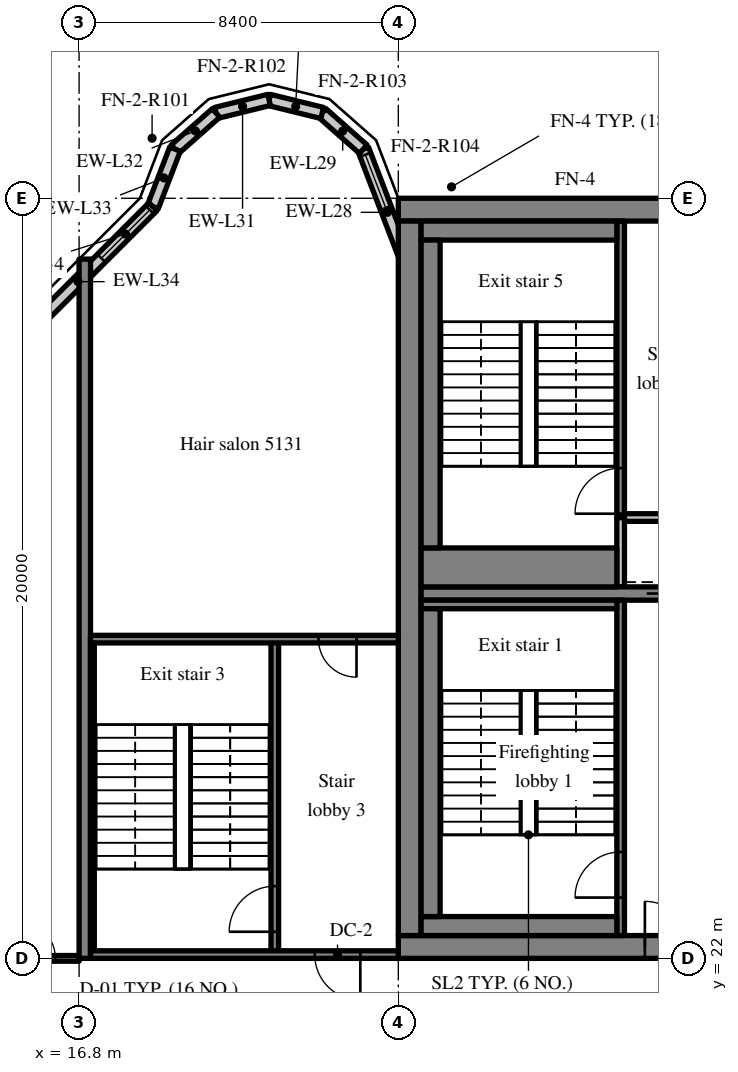
"""IFC4 building model, lengths in metres.
Left out: names, types, materials, properties, quantities, classifications, styles, units other than length and angle.
Written with IfcOpenShell. Run it as: python <this file> out.ifc"""

import sys

from ifc_helpers import new_model, si_unit, direction, frame, frame_2d, origin, place, context, subcontext, project, spatial, rectangle, extrude, source, transform, mapped, element, fill, save


model = new_model("IFC4")
c1 = context("Model", 3, precision=1e-05, world=origin(), true_north=direction((0.0, 1.0)))
c2 = subcontext(c1, "Body", "Model", "MODEL_VIEW")
j1 = project(units=[si_unit("LENGTHUNIT", "METRE"), si_unit("PLANEANGLEUNIT", "RADIAN")], contexts=[c1])
p1 = place(None, origin())
s1 = spatial("IfcSite", under=j1, at=p1, CompositionType="ELEMENT")
p2 = place(p1, origin())
s2 = spatial("IfcBuilding", under=s1, at=p2, CompositionType="ELEMENT")
p3 = place(p2, frame((0.0, 0.0, 214.0)))
s3 = spatial("IfcBuildingStorey", under=s2, at=p3, CompositionType="ELEMENT", Elevation=214.0)
m1 = source(origin(), c2, "Body", "SweptSolid", [
    extrude(rectangle(XDim=50.4, YDim=0.6, at=frame_2d((25.2, 0.0))), origin(), (0.0, 0.0, 1.0), 3.62),
])
p4 = place(p3, frame((25.2, 22.3, 0.0), z_axis=(0.0, 0.0, 1.0), x_axis=(1.0, 0.0, 0.0)))
e1 = element("IfcWall", 1, at=p4, inside=s3, PredefinedType="SHEAR", context=c2, shape_type="MappedRepresentation", body=[
    mapped(m1, transform((0.0, 0.0, 0.0), scale=1.0)),
])
m2 = source(origin(), c2, "Body", "SweptSolid", [
    extrude(rectangle(XDim=1.8, YDim=2.1, at=frame_2d((0.9, 1.05))), frame((0.0, 0.31, 0.0), z_axis=(0.0, -1.0, 0.0), x_axis=(1.0, 0.0, 0.0)), (0.0, 0.0, 1.0), 0.62),
])
p5 = place(p4, frame((15.9, 0.0, 0.0)))
e2 = element("IfcOpeningElement", 2, at=p5, cuts=e1, PredefinedType="OPENING", context=c2, shape_type="MappedRepresentation", body=[
    mapped(m2, transform((0.0, 0.0, 0.0), scale=1.0)),
])
m3 = source(origin(), c2, "Body", "SweptSolid", [
    extrude(rectangle(XDim=0.9, YDim=2.1, at=frame_2d((0.45, 1.05))), frame((0.0, 0.31, 0.0), z_axis=(0.0, -1.0, 0.0), x_axis=(1.0, 0.0, 0.0)), (0.0, 0.0, 1.0), 0.62),
])
p6 = place(p4, frame((9.687, 0.0, 0.0)))
e3 = element("IfcOpeningElement", 3, at=p6, cuts=e1, PredefinedType="OPENING", context=c2, shape_type="MappedRepresentation", body=[
    mapped(m3, transform((0.0, 0.0, 0.0), scale=1.0)),
])
p7 = place(p4, frame((21.513, 0.0, 0.0)))
e4 = element("IfcOpeningElement", 4, at=p7, cuts=e1, PredefinedType="OPENING", context=c2, shape_type="MappedRepresentation", body=[
    mapped(m3, transform((0.0, 0.0, 0.0), scale=1.0)),
])
p8 = place(p4, frame((32.7, 0.0, 0.0)))
e5 = element("IfcOpeningElement", 5, at=p8, cuts=e1, PredefinedType="OPENING", context=c2, shape_type="MappedRepresentation", body=[
    mapped(m2, transform((0.0, 0.0, 0.0), scale=1.0)),
])
m4 = source(origin(), c2, "Body", "SweptSolid", [
    extrude(rectangle(XDim=1.2, YDim=2.1, at=frame_2d((0.6, 1.05))), frame((0.0, 0.31, 0.0), z_axis=(0.0, -1.0, 0.0), x_axis=(1.0, 0.0, 0.0)), (0.0, 0.0, 1.0), 0.62),
])
p9 = place(p4, frame((6.488, 0.0, 0.0)))
e6 = element("IfcOpeningElement", 6, at=p9, cuts=e1, PredefinedType="OPENING", context=c2, shape_type="MappedRepresentation", body=[
    mapped(m4, transform((0.0, 0.0, 0.0), scale=1.0)),
])
p10 = place(p4, frame((47.925, 0.0, 0.0)))
e7 = element("IfcOpeningElement", 7, at=p10, cuts=e1, PredefinedType="OPENING", context=c2, shape_type="MappedRepresentation", body=[
    mapped(m4, transform((0.0, 0.0, 0.0), scale=1.0)),
])
p11 = place(p3, frame((25.2, 41.7, 0.0), z_axis=(0.0, 0.0, 1.0), x_axis=(1.0, 0.0, 0.0)))
e8 = element("IfcWall", 8, at=p11, inside=s3, PredefinedType="SHEAR", context=c2, shape_type="MappedRepresentation", body=[
    mapped(m1, transform((0.0, 0.0, 0.0), scale=1.0)),
])
m5 = source(origin(), c2, "Body", "SweptSolid", [
    extrude(rectangle(XDim=18.8, YDim=0.6, at=frame_2d((9.4, 0.0))), origin(), (0.0, 0.0, 1.0), 3.62),
])
p12 = place(p3, frame((25.5, 22.6, 0.0), z_axis=(0.0, 0.0, 1.0), x_axis=(0.0, 1.0, 0.0)))
e9 = element("IfcWall", 9, at=p12, inside=s3, PredefinedType="SHEAR", context=c2, shape_type="MappedRepresentation", body=[
    mapped(m5, transform((0.0, 0.0, 0.0), scale=1.0)),
])
m6 = source(origin(), c2, "Body", "SweptSolid", [
    extrude(rectangle(XDim=7.625, YDim=0.35, at=frame_2d((3.812, 0.0))), origin(), (0.0, 0.0, 1.0), 3.62),
])
p13 = place(p3, frame((25.8, 31.6, 0.0), z_axis=(0.0, 0.0, 1.0), x_axis=(1.0, 0.0, 0.0)))
e10 = element("IfcWall", 10, at=p13, inside=s3, PredefinedType="SHEAR", context=c2, shape_type="MappedRepresentation", body=[
    mapped(m6, transform((0.0, 0.0, 0.0), scale=1.0)),
])
m7 = source(origin(), c2, "Body", "SweptSolid", [
    extrude(rectangle(XDim=1.1, YDim=2.1, at=frame_2d((0.55, 1.05))), frame((0.0, 0.185, 0.0), z_axis=(0.0, -1.0, 0.0), x_axis=(1.0, 0.0, 0.0)), (0.0, 0.0, 1.0), 0.37),
])
p14 = place(p13, frame((5.938, 0.0, 0.0)))
e11 = element("IfcOpeningElement", 11, at=p14, cuts=e10, PredefinedType="OPENING", context=c2, shape_type="MappedRepresentation", body=[
    mapped(m7, transform((0.0, 0.0, 0.0), scale=1.0)),
])
m8 = source(origin(), c2, "Body", "SweptSolid", [
    extrude(rectangle(XDim=18.4, YDim=0.3, at=frame_2d((9.2, 0.0))), origin(), (0.0, 0.0, 1.0), 3.62),
])
p15 = place(p3, frame((16.95, 22.0, 0.0), z_axis=(0.0, 0.0, 1.0), x_axis=(0.0, 1.0, 0.0)))
e12 = element("IfcWall", 12, at=p15, inside=s3, PredefinedType="SHEAR", context=c2, shape_type="MappedRepresentation", body=[
    mapped(m8, transform((0.0, 0.0, 0.0), scale=1.0)),
])
m9 = source(origin(), c2, "Body", "SweptSolid", [
    extrude(rectangle(XDim=3.559, YDim=0.3, at=frame_2d((1.78, 0.0))), origin(), (0.0, 0.0, 1.0), 3.62),
])
p16 = place(p3, frame((25.55, 39.969, 0.0), z_axis=(0.0, 0.0, 1.0), x_axis=(-0.35779745313, 0.933799219604, 0.0)))
e13 = element("IfcWall", 13, at=p16, inside=s3, PredefinedType="SOLIDWALL", context=c2, shape_type="MappedRepresentation", body=[
    mapped(m9, transform((0.0, 0.0, 0.0), scale=1.0)),
])
m10 = source(origin(), c2, "Body", "SweptSolid", [
    extrude(rectangle(XDim=1.5, YDim=2.0, at=frame_2d((0.75, 1.0))), frame((0.0, 0.16, 0.0), z_axis=(0.0, -1.0, 0.0), x_axis=(1.0, 0.0, 0.0)), (0.0, 0.0, 1.0), 0.32),
])
p17 = place(p16, frame((1.903, 0.0, 0.9)))
e14 = element("IfcOpeningElement", 14, at=p17, cuts=e13, PredefinedType="OPENING", context=c2, shape_type="MappedRepresentation", body=[
    mapped(m10, transform((0.0, 0.0, 0.0), scale=1.0)),
])
m11 = source(origin(), c2, "Body", "SweptSolid", [
    extrude(rectangle(XDim=1.44, YDim=0.3, at=frame_2d((0.72, 0.0))), origin(), (0.0, 0.0, 1.0), 3.62),
])
p18 = place(p3, frame((24.277, 43.292, 0.0), z_axis=(0.0, 0.0, 1.0), x_axis=(-0.749649827867, 0.661834673902, 0.0)))
e15 = element("IfcWall", 15, at=p18, inside=s3, PredefinedType="SOLIDWALL", context=c2, shape_type="MappedRepresentation", body=[
    mapped(m11, transform((0.0, 0.0, 0.0), scale=1.0)),
])
m12 = source(origin(), c2, "Body", "SweptSolid", [
    extrude(rectangle(XDim=1.438, YDim=0.3, at=frame_2d((0.719, 0.0))), origin(), (0.0, 0.0, 1.0), 3.62),
])
p19 = place(p3, frame((23.197, 44.245, 0.0), z_axis=(0.0, 0.0, 1.0), x_axis=(-0.971152283879, 0.238460146601, 0.0)))
e16 = element("IfcWall", 16, at=p19, inside=s3, PredefinedType="SOLIDWALL", context=c2, shape_type="MappedRepresentation", body=[
    mapped(m12, transform((0.0, 0.0, 0.0), scale=1.0)),
])
m13 = source(origin(), c2, "Body", "SweptSolid", [
    extrude(rectangle(XDim=1.439, YDim=0.3, at=frame_2d((0.719, 0.0))), origin(), (0.0, 0.0, 1.0), 3.62),
])
p20 = place(p3, frame((21.8, 44.588, 0.0), z_axis=(0.0, 0.0, 1.0), x_axis=(-0.971161932466, -0.238420848351, 0.0)))
e17 = element("IfcWall", 17, at=p20, inside=s3, PredefinedType="SOLIDWALL", context=c2, shape_type="MappedRepresentation", body=[
    mapped(m13, transform((0.0, 0.0, 0.0), scale=1.0)),
])
m14 = source(origin(), c2, "Body", "SweptSolid", [
    extrude(rectangle(XDim=1.44, YDim=0.3, at=frame_2d((0.72, 0.0))), origin(), (0.0, 0.0, 1.0), 3.62),
])
p21 = place(p3, frame((20.403, 44.245, 0.0), z_axis=(0.0, 0.0, 1.0), x_axis=(-0.74957555648, -0.661918790432, 0.0)))
e18 = element("IfcWall", 18, at=p21, inside=s3, PredefinedType="SOLIDWALL", context=c2, shape_type="MappedRepresentation", body=[
    mapped(m14, transform((0.0, 0.0, 0.0), scale=1.0)),
])
m15 = source(origin(), c2, "Body", "SweptSolid", [
    extrude(rectangle(XDim=1.622, YDim=0.3, at=frame_2d((0.811, 0.0))), origin(), (0.0, 0.0, 1.0), 3.62),
])
p22 = place(p3, frame((19.323, 43.292, 0.0), z_axis=(0.0, 0.0, 1.0), x_axis=(-0.357778527068, -0.933806471154, 0.0)))
e19 = element("IfcWall", 19, at=p22, inside=s3, PredefinedType="SOLIDWALL", context=c2, shape_type="MappedRepresentation", body=[
    mapped(m15, transform((0.0, 0.0, 0.0), scale=1.0)),
])
m16 = source(origin(), c2, "Body", "SweptSolid", [
    extrude(rectangle(XDim=5.576, YDim=0.3, at=frame_2d((2.788, 0.0))), origin(), (0.0, 0.0, 1.0), 3.62),
])
p23 = place(p3, frame((18.743, 41.777, 0.0), z_axis=(0.0, 0.0, 1.0), x_axis=(-0.707106781187, -0.707106781187, 0.0)))
e20 = element("IfcWall", 20, at=p23, inside=s3, PredefinedType="SOLIDWALL", context=c2, shape_type="MappedRepresentation", body=[
    mapped(m16, transform((0.0, 0.0, 0.0), scale=1.0)),
])
m17 = source(origin(), c2, "Body", "SweptSolid", [
    extrude(rectangle(XDim=1.8, YDim=1.5, at=frame_2d((0.9, 0.75))), frame((0.0, 0.16, 0.0), z_axis=(0.0, -1.0, 0.0), x_axis=(1.0, 0.0, 0.0)), (0.0, 0.0, 1.0), 0.32),
])
p24 = place(p23, frame((0.118, 0.0, 0.9)))
e21 = element("IfcOpeningElement", 21, at=p24, cuts=e20, PredefinedType="OPENING", context=c2, shape_type="MappedRepresentation", body=[
    mapped(m17, transform((0.0, 0.0, 0.0), scale=1.0)),
])
m18 = source(origin(), c2, "Body", "SweptSolid", [
    extrude(rectangle(XDim=8.825, YDim=0.2, at=frame_2d((4.413, 0.0))), origin(), (0.0, 0.0, 1.0), 3.62),
])
p25 = place(p3, frame((31.05, 22.6, 0.0), z_axis=(0.0, 0.0, 1.0), x_axis=(0.0, 1.0, 0.0)))
e22 = element("IfcWall", 22, at=p25, inside=s3, PredefinedType="SOLIDWALL", context=c2, shape_type="MappedRepresentation", body=[
    mapped(m18, transform((0.0, 0.0, 0.0), scale=1.0)),
])
m19 = source(origin(), c2, "Body", "SweptSolid", [
    extrude(rectangle(XDim=1.2, YDim=2.1, at=frame_2d((0.6, 1.05))), frame((0.0, 0.11, 0.0), z_axis=(0.0, -1.0, 0.0), x_axis=(1.0, 0.0, 0.0)), (0.0, 0.0, 1.0), 0.22),
])
p26 = place(p25, frame((1.0, 0.0, 0.0)))
e23 = element("IfcOpeningElement", 23, at=p26, cuts=e22, PredefinedType="OPENING", context=c2, shape_type="MappedRepresentation", body=[
    mapped(m19, transform((0.0, 0.0, 0.0), scale=1.0)),
])
m20 = source(origin(), c2, "Body", "SweptSolid", [
    extrude(rectangle(XDim=1.825, YDim=0.2, at=frame_2d((0.913, 0.0))), origin(), (0.0, 0.0, 1.0), 3.62),
])
p27 = place(p3, frame((31.05, 31.775, 0.0), z_axis=(0.0, 0.0, 1.0), x_axis=(0.0, 1.0, 0.0)))
e24 = element("IfcWall", 24, at=p27, inside=s3, PredefinedType="SOLIDWALL", context=c2, shape_type="MappedRepresentation", body=[
    mapped(m20, transform((0.0, 0.0, 0.0), scale=1.0)),
])
m21 = source(origin(), c2, "Body", "SweptSolid", [
    extrude(rectangle(XDim=2.275, YDim=0.2, at=frame_2d((1.138, 0.0))), origin(), (0.0, 0.0, 1.0), 3.62),
])
p28 = place(p3, frame((31.15, 33.6, 0.0), z_axis=(0.0, 0.0, 1.0), x_axis=(1.0, 0.0, 0.0)))
e25 = element("IfcWall", 25, at=p28, inside=s3, PredefinedType="SOLIDWALL", context=c2, shape_type="MappedRepresentation", body=[
    mapped(m21, transform((0.0, 0.0, 0.0), scale=1.0)),
])
m22 = source(origin(), c2, "Body", "SweptSolid", [
    extrude(rectangle(XDim=7.8, YDim=0.2, at=frame_2d((3.9, 0.0))), origin(), (0.0, 0.0, 1.0), 3.62),
])
p29 = place(p3, frame((31.05, 33.6, 0.0), z_axis=(0.0, 0.0, 1.0), x_axis=(0.0, 1.0, 0.0)))
e26 = element("IfcWall", 26, at=p29, inside=s3, PredefinedType="SOLIDWALL", context=c2, shape_type="MappedRepresentation", body=[
    mapped(m22, transform((0.0, 0.0, 0.0), scale=1.0)),
])
p30 = place(p29, frame((0.1, 0.0, 0.0)))
e27 = element("IfcOpeningElement", 27, at=p30, cuts=e26, PredefinedType="OPENING", context=c2, shape_type="MappedRepresentation", body=[
    mapped(m19, transform((0.0, 0.0, 0.0), scale=1.0)),
])
m23 = source(origin(), c2, "Body", "SweptSolid", [
    extrude(rectangle(XDim=8.3, YDim=0.2, at=frame_2d((4.15, 0.0))), origin(), (0.0, 0.0, 1.0), 3.62),
])
p31 = place(p3, frame((21.95, 22.1, 0.0), z_axis=(0.0, 0.0, 1.0), x_axis=(0.0, 1.0, 0.0)))
e28 = element("IfcWall", 28, at=p31, inside=s3, PredefinedType="SOLIDWALL", context=c2, shape_type="MappedRepresentation", body=[
    mapped(m23, transform((0.0, 0.0, 0.0), scale=1.0)),
])
p32 = place(p31, frame((0.6, 0.0, 0.0)))
e29 = element("IfcOpeningElement", 29, at=p32, cuts=e28, PredefinedType="OPENING", context=c2, shape_type="MappedRepresentation", body=[
    mapped(m19, transform((0.0, 0.0, 0.0), scale=1.0)),
])
m24 = source(origin(), c2, "Body", "SweptSolid", [
    extrude(rectangle(XDim=8.1, YDim=0.2, at=frame_2d((4.05, 0.0))), origin(), (0.0, 0.0, 1.0), 3.62),
])
p33 = place(p3, frame((17.1, 22.1, 0.0), z_axis=(0.0, 0.0, 1.0), x_axis=(1.0, 0.0, 0.0)))
e30 = element("IfcWall", 30, at=p33, inside=s3, PredefinedType="SOLIDWALL", context=c2, shape_type="MappedRepresentation", body=[
    mapped(m24, transform((0.0, 0.0, 0.0), scale=1.0)),
])
p34 = place(p33, frame((5.9, 0.0, 0.0)))
e31 = element("IfcOpeningElement", 31, at=p34, cuts=e30, PredefinedType="OPENING", context=c2, shape_type="MappedRepresentation", body=[
    mapped(m19, transform((0.0, 0.0, 0.0), scale=1.0)),
])
p35 = place(p3, frame((17.1, 30.4, 0.0), z_axis=(0.0, 0.0, 1.0), x_axis=(1.0, 0.0, 0.0)))
e32 = element("IfcWall", 32, at=p35, inside=s3, PredefinedType="SOLIDWALL", context=c2, shape_type="MappedRepresentation", body=[
    mapped(m24, transform((0.0, 0.0, 0.0), scale=1.0)),
])
m25 = source(origin(), c2, "Body", "SweptSolid", [
    extrude(rectangle(XDim=1.0, YDim=2.1, at=frame_2d((0.5, 1.05))), frame((0.0, 0.11, 0.0), z_axis=(0.0, -1.0, 0.0), x_axis=(1.0, 0.0, 0.0)), (0.0, 0.0, 1.0), 0.22),
])
p36 = place(p35, frame((6.0, 0.0, 0.0)))
e33 = element("IfcOpeningElement", 33, at=p36, cuts=e32, PredefinedType="OPENING", context=c2, shape_type="MappedRepresentation", body=[
    mapped(m25, transform((0.0, 0.0, 0.0), scale=1.0)),
])
m26 = source(origin(), c2, "Body", "SweptSolid", [
    extrude(rectangle(XDim=5.15, YDim=0.5, at=frame_2d((2.575, 0.0))), origin(), (0.0, 0.0, 1.0), 3.62),
])
p37 = place(p3, frame((25.8, 22.85, 0.0), z_axis=(0.0, 0.0, 1.0), x_axis=(1.0, 0.0, 0.0)))
e34 = element("IfcWall", 34, at=p37, inside=s3, PredefinedType="SOLIDWALL", context=c2, shape_type="MappedRepresentation", body=[
    mapped(m26, transform((0.0, 0.0, 0.0), scale=1.0)),
])
m27 = source(origin(), c2, "Body", "SweptSolid", [
    extrude(rectangle(XDim=5.15, YDim=0.225, at=frame_2d((2.575, 0.0))), origin(), (0.0, 0.0, 1.0), 3.62),
])
p38 = place(p3, frame((25.8, 31.312, 0.0), z_axis=(0.0, 0.0, 1.0), x_axis=(1.0, 0.0, 0.0)))
e35 = element("IfcWall", 35, at=p38, inside=s3, PredefinedType="SOLIDWALL", context=c2, shape_type="MappedRepresentation", body=[
    mapped(m27, transform((0.0, 0.0, 0.0), scale=1.0)),
])
m28 = source(origin(), c2, "Body", "SweptSolid", [
    extrude(rectangle(XDim=8.1, YDim=0.5, at=frame_2d((4.05, 0.0))), origin(), (0.0, 0.0, 1.0), 3.62),
])
p39 = place(p3, frame((26.05, 23.1, 0.0), z_axis=(0.0, 0.0, 1.0), x_axis=(0.0, 1.0, 0.0)))
e36 = element("IfcWall", 36, at=p39, inside=s3, PredefinedType="SOLIDWALL", context=c2, shape_type="MappedRepresentation", body=[
    mapped(m28, transform((0.0, 0.0, 0.0), scale=1.0)),
])
m29 = source(origin(), c2, "Body", "SweptSolid", [
    extrude(rectangle(XDim=8.1, YDim=0.1, at=frame_2d((4.05, 0.0))), origin(), (0.0, 0.0, 1.0), 3.62),
])
p40 = place(p3, frame((17.15, 22.2, 0.0), z_axis=(0.0, 0.0, 1.0), x_axis=(0.0, 1.0, 0.0)))
e37 = element("IfcWall", 37, at=p40, inside=s3, PredefinedType="SOLIDWALL", context=c2, shape_type="MappedRepresentation", body=[
    mapped(m29, transform((0.0, 0.0, 0.0), scale=1.0)),
])
p41 = place(p3, frame((25.8, 41.15, 0.0), z_axis=(0.0, 0.0, 1.0), x_axis=(1.0, 0.0, 0.0)))
e38 = element("IfcWall", 38, at=p41, inside=s3, PredefinedType="SOLIDWALL", context=c2, shape_type="MappedRepresentation", body=[
    mapped(m26, transform((0.0, 0.0, 0.0), scale=1.0)),
])
m30 = source(origin(), c2, "Body", "SweptSolid", [
    extrude(rectangle(XDim=5.15, YDim=1.025, at=frame_2d((2.575, 0.0))), origin(), (0.0, 0.0, 1.0), 3.62),
])
p42 = place(p3, frame((25.8, 32.287, 0.0), z_axis=(0.0, 0.0, 1.0), x_axis=(1.0, 0.0, 0.0)))
e39 = element("IfcWall", 39, at=p42, inside=s3, PredefinedType="SOLIDWALL", context=c2, shape_type="MappedRepresentation", body=[
    mapped(m30, transform((0.0, 0.0, 0.0), scale=1.0)),
])
p43 = place(p3, frame((26.05, 32.8, 0.0), z_axis=(0.0, 0.0, 1.0), x_axis=(0.0, 1.0, 0.0)))
e40 = element("IfcWall", 40, at=p43, inside=s3, PredefinedType="SOLIDWALL", context=c2, shape_type="MappedRepresentation", body=[
    mapped(m28, transform((0.0, 0.0, 0.0), scale=1.0)),
])
m31 = source(origin(), c2, "Body", "SweptSolid", [
    extrude(rectangle(XDim=1.9, YDim=0.15, at=frame_2d((0.95, 0.0))), origin(), (0.0, 0.0, 1.0), 2.92),
])
p44 = place(p3, frame((14.9, 22.0, 0.0), z_axis=(0.0, 0.0, 1.0), x_axis=(1.0, 0.0, 0.0)))
e41 = element("IfcWall", 41, at=p44, inside=s3, PredefinedType="PARTITIONING", context=c2, shape_type="MappedRepresentation", body=[
    mapped(m31, transform((0.0, 0.0, 0.0), scale=1.0)),
])
m32 = source(origin(), c2, "Body", "SweptSolid", [
    extrude(rectangle(XDim=1.0, YDim=2.1, at=frame_2d((0.5, 1.05))), frame((0.0, 0.085, 0.0), z_axis=(0.0, -1.0, 0.0), x_axis=(1.0, 0.0, 0.0)), (0.0, 0.0, 1.0), 0.17),
])
p45 = place(p44, frame((0.275, 0.0, 0.0)))
e42 = element("IfcOpeningElement", 42, at=p45, cuts=e41, PredefinedType="OPENING", context=c2, shape_type="MappedRepresentation", body=[
    mapped(m32, transform((0.0, 0.0, 0.0), scale=1.0)),
])
m33 = source(origin(), c2, "Body", "SweptSolid", [
    extrude(rectangle(XDim=1.5, YDim=2.0, at=frame_2d((0.75, 1.0))), frame((0.0, 0.03, 0.0), z_axis=(0.0, -1.0, 0.0), x_axis=(1.0, 0.0, 0.0)), (0.0, 0.0, 1.0), 0.06),
])
p46 = place(p17, origin())
e43 = element("IfcWindow", 43, at=p46, inside=s3, PartitioningType="SINGLE_PANEL", PredefinedType="WINDOW", context=c2, shape_type="MappedRepresentation", body=[
    mapped(m33, transform((0.0, 0.0, 0.0), scale=1.0)),
])
fill(e14, e43)
m34 = source(origin(), c2, "Body", "SweptSolid", [
    extrude(rectangle(XDim=1.8, YDim=1.5, at=frame_2d((0.9, 0.75))), frame((0.0, 0.03, 0.0), z_axis=(0.0, -1.0, 0.0), x_axis=(1.0, 0.0, 0.0)), (0.0, 0.0, 1.0), 0.06),
])
p47 = place(p24, origin())
e44 = element("IfcWindow", 44, at=p47, inside=s3, PartitioningType="SINGLE_PANEL", PredefinedType="WINDOW", context=c2, shape_type="MappedRepresentation", body=[
    mapped(m34, transform((0.0, 0.0, 0.0), scale=1.0)),
])
fill(e21, e44)
m35 = source(origin(), c2, "Body", "SweptSolid", [
    extrude(rectangle(XDim=1.2, YDim=2.1, at=frame_2d((0.6, 1.05))), frame((0.0, 0.025, 0.0), z_axis=(0.0, -1.0, 0.0), x_axis=(1.0, 0.0, 0.0)), (0.0, 0.0, 1.0), 0.05),
])
p48 = place(p26, origin())
e45 = element("IfcDoor", 45, at=p48, inside=s3, OperationType="SINGLE_SWING_LEFT", PredefinedType="DOOR", context=c2, shape_type="MappedRepresentation", body=[
    mapped(m35, transform((0.0, 0.0, 0.0), scale=1.0)),
])
fill(e23, e45)
m36 = source(origin(), c2, "Body", "SweptSolid", [
    extrude(rectangle(XDim=1.2, YDim=2.1, at=frame_2d((0.6, 1.05))), frame((0.0, 0.225, 0.0), z_axis=(0.0, -1.0, 0.0), x_axis=(1.0, 0.0, 0.0)), (0.0, 0.0, 1.0), 0.05),
])
p49 = place(p9, origin())
e46 = element("IfcDoor", 46, at=p49, inside=s3, OperationType="SINGLE_SWING_LEFT", PredefinedType="DOOR", context=c2, shape_type="MappedRepresentation", body=[
    mapped(m36, transform((0.0, 0.0, 0.0), scale=1.0)),
])
fill(e6, e46)
m37 = source(origin(), c2, "Body", "SweptSolid", [
    extrude(rectangle(XDim=1.1, YDim=2.1, at=frame_2d((0.55, 1.05))), frame((0.0, 0.025, 0.0), z_axis=(0.0, -1.0, 0.0), x_axis=(1.0, 0.0, 0.0)), (0.0, 0.0, 1.0), 0.05),
])
p50 = place(p14, origin())
e47 = element("IfcDoor", 47, at=p50, inside=s3, OperationType="SLIDING_TO_LEFT", PredefinedType="DOOR", context=c2, shape_type="MappedRepresentation", body=[
    mapped(m37, transform((0.0, 0.0, 0.0), scale=1.0)),
])
fill(e11, e47)
p51 = place(p30, origin())
e48 = element("IfcDoor", 48, at=p51, inside=s3, OperationType="SINGLE_SWING_LEFT", PredefinedType="DOOR", context=c2, shape_type="MappedRepresentation", body=[
    mapped(m35, transform((0.0, 0.0, 0.0), scale=1.0)),
])
fill(e27, e48)
p52 = place(p32, origin())
e49 = element("IfcDoor", 49, at=p52, inside=s3, OperationType="SINGLE_SWING_LEFT", PredefinedType="DOOR", context=c2, shape_type="MappedRepresentation", body=[
    mapped(m35, transform((0.0, 0.0, 0.0), scale=1.0)),
])
fill(e29, e49)
p53 = place(p34, origin())
e50 = element("IfcDoor", 50, at=p53, inside=s3, OperationType="SINGLE_SWING_RIGHT", PredefinedType="DOOR", context=c2, shape_type="MappedRepresentation", body=[
    mapped(m35, transform((0.0, 0.0, 0.0), scale=1.0)),
])
fill(e31, e50)
m38 = source(origin(), c2, "Body", "SweptSolid", [
    extrude(rectangle(XDim=1.0, YDim=2.1, at=frame_2d((0.5, 1.05))), frame((0.0, 0.025, 0.0), z_axis=(0.0, -1.0, 0.0), x_axis=(1.0, 0.0, 0.0)), (0.0, 0.0, 1.0), 0.05),
])
p54 = place(p36, origin())
e51 = element("IfcDoor", 51, at=p54, inside=s3, OperationType="SINGLE_SWING_RIGHT", PredefinedType="DOOR", context=c2, shape_type="MappedRepresentation", body=[
    mapped(m38, transform((0.0, 0.0, 0.0), scale=1.0)),
])
fill(e33, e51)
p55 = place(p45, origin())
e52 = element("IfcDoor", 52, at=p55, inside=s3, OperationType="SINGLE_SWING_LEFT", PredefinedType="DOOR", context=c2, shape_type="MappedRepresentation", body=[
    mapped(m38, transform((0.0, 0.0, 0.0), scale=1.0)),
])
fill(e42, e52)
save(model, sys.argv[1])
